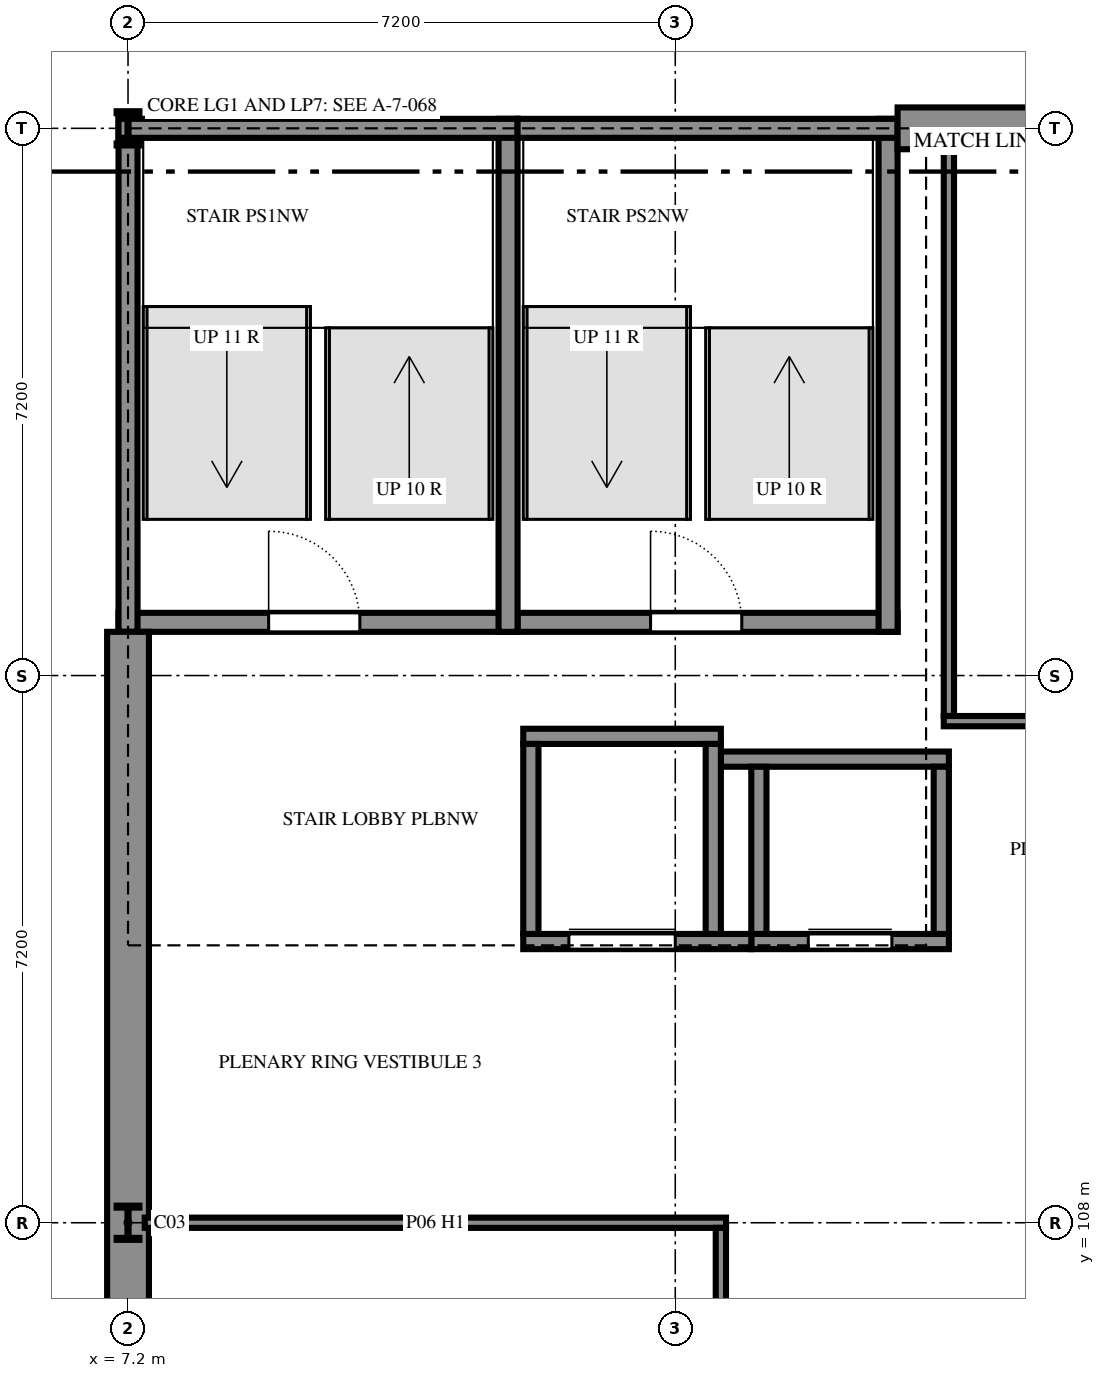
"""IFC4 building model, lengths in metres.
Left out: names, types, materials, properties, quantities, classifications, styles, units other than length and angle.
Written with IfcOpenShell. Run it as: python <this file> out.ifc"""

import sys

from ifc_helpers import new_model, si_unit, direction, frame, frame_2d, origin, origin_2d, place, context, subcontext, project, spatial, rectangle, i_section, extrude, element, fill, save


model = new_model("IFC4")
c1 = context("Model", 3, precision=1e-05, world=origin(), true_north=direction((0.0, 1.0)))
c2 = subcontext(c1, "Body", "Model", "MODEL_VIEW")
j1 = project(units=[si_unit("LENGTHUNIT", "METRE"), si_unit("PLANEANGLEUNIT", "RADIAN")], contexts=[c1])
p1 = place(None, origin())
s1 = spatial("IfcSite", under=j1, at=p1, CompositionType="ELEMENT")
p2 = place(p1, origin())
s2 = spatial("IfcBuilding", under=s1, at=p2, CompositionType="ELEMENT")
p3 = place(p2, frame((0.0, 0.0, 3.6)))
s3 = spatial("IfcBuildingStorey", under=s2, at=p3, CompositionType="ELEMENT", Elevation=3.6)
for number, where, z_axis, x_axis in (
    (1, (7.2, 108.0, 0.0), (0.0, 0.0, 1.0), (1.0, 0.0, 0.0)),
    (2, (7.2, 122.4, 0.0), (0.0, 0.0, 1.0), (1.0, 0.0, 0.0)),
):
    element("IfcColumn", number, at=place(p3, frame(where, z_axis=z_axis, x_axis=x_axis)), inside=s3, PredefinedType="COLUMN", context=c2, shape_type="SweptSolid", body=[
        extrude(i_section(OverallWidth=0.3, OverallDepth=0.45, WebThickness=0.014, FlangeThickness=0.026, FilletRadius=0.027, at=origin_2d()), origin(), (0.0, 0.0, 1.0), 3.6),
    ])
p4 = place(p3, frame((7.075, 115.9, 0.0), z_axis=(0.0, 0.0, 1.0), x_axis=(1.0, 0.0, 0.0)))
e3 = element("IfcWall", 3, at=p4, inside=s3, PredefinedType="SHEAR", context=c2, shape_type="SweptSolid", body=[
    extrude(rectangle(XDim=5.25, YDim=0.25, at=frame_2d((2.625, 0.0))), origin(), (0.0, 0.0, 1.0), 3.6),
])
p5 = place(p4, frame((1.975, 0.0, 0.0)))
e4 = element("IfcOpeningElement", 4, at=p5, cuts=e3, PredefinedType="OPENING", context=c2, shape_type="SweptSolid", body=[
    extrude(rectangle(XDim=1.2, YDim=2.4, at=frame_2d((0.6, 1.2))), frame((0.0, 0.135, 0.0), z_axis=(0.0, -1.0, 0.0), x_axis=(1.0, 0.0, 0.0)), (0.0, 0.0, 1.0), 0.27),
])
p6 = place(p3, frame((12.325, 115.9, 0.0), z_axis=(0.0, 0.0, 1.0), x_axis=(1.0, 0.0, 0.0)))
e5 = element("IfcWall", 5, at=p6, inside=s3, PredefinedType="SHEAR", context=c2, shape_type="SweptSolid", body=[
    extrude(rectangle(XDim=5.0, YDim=0.25, at=frame_2d((2.5, 0.0))), origin(), (0.0, 0.0, 1.0), 3.6),
])
p7 = place(p6, frame((1.75, 0.0, 0.0)))
e6 = element("IfcOpeningElement", 6, at=p7, cuts=e5, PredefinedType="OPENING", context=c2, shape_type="SweptSolid", body=[
    extrude(rectangle(XDim=1.2, YDim=2.4, at=frame_2d((0.6, 1.2))), frame((0.0, 0.135, 0.0), z_axis=(0.0, -1.0, 0.0), x_axis=(1.0, 0.0, 0.0)), (0.0, 0.0, 1.0), 0.27),
])
for number, where, z_axis, x_axis in (
    (7, (12.2, 115.775, 0.0), (0.0, 0.0, 1.0), (0.0, 1.0, 0.0)),
    (8, (17.2, 115.775, 0.0), (0.0, 0.0, 1.0), (0.0, 1.0, 0.0)),
    (9, (7.2, 122.525, 0.0), (0.0, 0.0, 1.0), (0.0, -1.0, 0.0)),
):
    element("IfcWall", number, at=place(p3, frame(where, z_axis=z_axis, x_axis=x_axis)), inside=s3, PredefinedType="SHEAR", context=c2, shape_type="SweptSolid", body=[
        extrude(rectangle(XDim=6.75, YDim=0.25, at=frame_2d((3.375, 0.0))), origin(), (0.0, 0.0, 1.0), 3.6),
    ])
p8 = place(p3, frame((12.325, 122.4, 0.0), z_axis=(0.0, 0.0, 1.0), x_axis=(-1.0, 0.0, 0.0)))
e10 = element("IfcWall", 10, at=p8, inside=s3, PredefinedType="SHEAR", context=c2, shape_type="SweptSolid", body=[
    extrude(rectangle(XDim=5.25, YDim=0.25, at=frame_2d((2.625, 0.0))), origin(), (0.0, 0.0, 1.0), 3.6),
])
p9 = place(p3, frame((17.325, 122.4, 0.0), z_axis=(0.0, 0.0, 1.0), x_axis=(-1.0, 0.0, 0.0)))
e11 = element("IfcWall", 11, at=p9, inside=s3, PredefinedType="SHEAR", context=c2, shape_type="SweptSolid", body=[
    extrude(rectangle(XDim=5.0, YDim=0.25, at=frame_2d((2.5, 0.0))), origin(), (0.0, 0.0, 1.0), 3.6),
])
p10 = place(p3, frame((17.325, 122.4, 0.0), z_axis=(0.0, 0.0, 1.0), x_axis=(1.0, 0.0, 0.0)))
e12 = element("IfcWall", 12, at=p10, inside=s3, PredefinedType="SOLIDWALL", context=c2, shape_type="SweptSolid", body=[
    extrude(rectangle(XDim=47.475, YDim=0.55, at=frame_2d((23.738, 0.0))), origin(), (0.0, 0.0, 1.0), 3.6),
])
p11 = place(p3, frame((7.2, 60.525, 0.0), z_axis=(0.0, 0.0, 1.0), x_axis=(0.0, 1.0, 0.0)))
e13 = element("IfcWall", 13, at=p11, inside=s3, PredefinedType="SOLIDWALL", context=c2, shape_type="SweptSolid", body=[
    extrude(rectangle(XDim=55.25, YDim=0.55, at=frame_2d((27.625, 0.0))), origin(), (0.0, 0.0, 1.0), 3.6),
])
p12 = place(p3, frame((15.4, 111.7, 0.0), z_axis=(0.0, 0.0, 1.0), x_axis=(1.0, 0.0, 0.0)))
e14 = element("IfcWall", 14, at=p12, inside=s3, PredefinedType="SHEAR", context=c2, shape_type="SweptSolid", body=[
    extrude(rectangle(XDim=2.6, YDim=0.2, at=frame_2d((1.3, 0.0))), origin(), (0.0, 0.0, 1.0), 3.6),
])
p13 = place(p12, frame((0.75, 0.0, 0.0)))
e15 = element("IfcOpeningElement", 15, at=p13, cuts=e14, PredefinedType="OPENING", context=c2, shape_type="SweptSolid", body=[
    extrude(rectangle(XDim=1.1, YDim=2.1, at=frame_2d((0.55, 1.05))), frame((0.0, 0.11, 0.0), z_axis=(0.0, -1.0, 0.0), x_axis=(1.0, 0.0, 0.0)), (0.0, 0.0, 1.0), 0.22),
])
p14 = place(p3, frame((15.0, 114.1, 0.0), z_axis=(0.0, 0.0, 1.0), x_axis=(1.0, 0.0, 0.0)))
e16 = element("IfcWall", 16, at=p14, inside=s3, PredefinedType="SHEAR", context=c2, shape_type="SweptSolid", body=[
    extrude(rectangle(XDim=3.0, YDim=0.2, at=frame_2d((1.5, 0.0))), origin(), (0.0, 0.0, 1.0), 3.6),
])
for number, where, z_axis, x_axis in (
    (17, (15.5, 111.8, 0.0), (0.0, 0.0, 1.0), (0.0, 1.0, 0.0)),
    (18, (17.9, 111.8, 0.0), (0.0, 0.0, 1.0), (0.0, 1.0, 0.0)),
):
    element("IfcWall", number, at=place(p3, frame(where, z_axis=z_axis, x_axis=x_axis)), inside=s3, PredefinedType="SHEAR", context=c2, shape_type="SweptSolid", body=[
        extrude(rectangle(XDim=2.2, YDim=0.2, at=frame_2d((1.1, 0.0))), origin(), (0.0, 0.0, 1.0), 3.6),
    ])
p15 = place(p3, frame((12.4, 111.7, 0.0), z_axis=(0.0, 0.0, 1.0), x_axis=(1.0, 0.0, 0.0)))
e19 = element("IfcWall", 19, at=p15, inside=s3, PredefinedType="SHEAR", context=c2, shape_type="SweptSolid", body=[
    extrude(rectangle(XDim=3.0, YDim=0.2, at=frame_2d((1.5, 0.0))), origin(), (0.0, 0.0, 1.0), 3.6),
])
p16 = place(p15, frame((0.6, 0.0, 0.0)))
e20 = element("IfcOpeningElement", 20, at=p16, cuts=e19, PredefinedType="OPENING", context=c2, shape_type="SweptSolid", body=[
    extrude(rectangle(XDim=1.4, YDim=2.1, at=frame_2d((0.7, 1.05))), frame((0.0, 0.11, 0.0), z_axis=(0.0, -1.0, 0.0), x_axis=(1.0, 0.0, 0.0)), (0.0, 0.0, 1.0), 0.22),
])
p17 = place(p3, frame((12.4, 114.4, 0.0), z_axis=(0.0, 0.0, 1.0), x_axis=(1.0, 0.0, 0.0)))
e21 = element("IfcWall", 21, at=p17, inside=s3, PredefinedType="SHEAR", context=c2, shape_type="SweptSolid", body=[
    extrude(rectangle(XDim=2.6, YDim=0.2, at=frame_2d((1.3, 0.0))), origin(), (0.0, 0.0, 1.0), 3.6),
])
for number, where, z_axis, x_axis in (
    (22, (12.5, 111.8, 0.0), (0.0, 0.0, 1.0), (0.0, 1.0, 0.0)),
    (23, (14.9, 111.8, 0.0), (0.0, 0.0, 1.0), (0.0, 1.0, 0.0)),
):
    element("IfcWall", number, at=place(p3, frame(where, z_axis=z_axis, x_axis=x_axis)), inside=s3, PredefinedType="SHEAR", context=c2, shape_type="SweptSolid", body=[
        extrude(rectangle(XDim=2.5, YDim=0.2, at=frame_2d((1.25, 0.0))), origin(), (0.0, 0.0, 1.0), 3.6),
    ])
p18 = place(p3, frame((18.0, 122.18, 0.0), z_axis=(0.0, 0.0, 1.0), x_axis=(0.0, -1.0, 0.0)))
e24 = element("IfcWall", 24, at=p18, inside=s3, PredefinedType="PARTITIONING", context=c2, shape_type="SweptSolid", body=[
    extrude(rectangle(XDim=7.512, YDim=0.135, at=frame_2d((3.756, 0.0))), origin(), (0.0, 0.0, 1.0), 3.12),
])
p19 = place(p3, frame((30.6, 114.6, 0.0), z_axis=(0.0, 0.0, 1.0), x_axis=(-1.0, 0.0, 0.0)))
e25 = element("IfcWall", 25, at=p19, inside=s3, PredefinedType="PARTITIONING", context=c2, shape_type="SweptSolid", body=[
    extrude(rectangle(XDim=12.667, YDim=0.135, at=frame_2d((6.334, 0.0))), origin(), (0.0, 0.0, 1.0), 3.42),
])
p20 = place(p19, frame((5.85, 0.0, 0.0)))
e26 = element("IfcOpeningElement", 26, at=p20, cuts=e25, PredefinedType="OPENING", context=c2, shape_type="SweptSolid", body=[
    extrude(rectangle(XDim=1.0, YDim=2.4, at=frame_2d((0.5, 1.2))), frame((0.0, 0.077, 0.0), z_axis=(0.0, -1.0, 0.0), x_axis=(1.0, 0.0, 0.0)), (0.0, 0.0, 1.0), 0.155),
])
p21 = place(p3, frame((7.42, 108.0, 0.0), z_axis=(0.0, 0.0, 1.0), x_axis=(1.0, 0.0, 0.0)))
e27 = element("IfcWall", 27, at=p21, inside=s3, PredefinedType="PARTITIONING", context=c2, shape_type="SweptSolid", body=[
    extrude(rectangle(XDim=7.647, YDim=0.135, at=frame_2d((3.824, 0.0))), origin(), (0.0, 0.0, 1.0), 2.82),
])
p22 = place(p3, frame((15.0, 107.933, 0.0), z_axis=(0.0, 0.0, 1.0), x_axis=(0.0, -1.0, 0.0)))
e28 = element("IfcWall", 28, at=p22, inside=s3, PredefinedType="PARTITIONING", context=c2, shape_type="SweptSolid", body=[
    extrude(rectangle(XDim=21.395, YDim=0.135, at=frame_2d((10.698, 0.0))), origin(), (0.0, 0.0, 1.0), 3.42),
])
p23 = place(p22, frame((10.15, 0.0, 0.0)))
e29 = element("IfcOpeningElement", 29, at=p23, cuts=e28, PredefinedType="OPENING", context=c2, shape_type="SweptSolid", body=[
    extrude(rectangle(XDim=1.0, YDim=2.4, at=frame_2d((0.5, 1.2))), frame((0.0, 0.077, 0.0), z_axis=(0.0, -1.0, 0.0), x_axis=(1.0, 0.0, 0.0)), (0.0, 0.0, 1.0), 0.155),
])
p24 = place(p13, origin())
e30 = element("IfcDoor", 30, at=p24, inside=s3, OperationType="SLIDING_TO_LEFT", PredefinedType="DOOR", context=c2, shape_type="SweptSolid", body=[
    extrude(rectangle(XDim=1.1, YDim=2.1, at=frame_2d((0.55, 1.05))), frame((0.0, 0.025, 0.0), z_axis=(0.0, -1.0, 0.0), x_axis=(1.0, 0.0, 0.0)), (0.0, 0.0, 1.0), 0.05),
])
fill(e15, e30)
p25 = place(p16, origin())
e31 = element("IfcDoor", 31, at=p25, inside=s3, OperationType="SLIDING_TO_LEFT", PredefinedType="DOOR", context=c2, shape_type="SweptSolid", body=[
    extrude(rectangle(XDim=1.4, YDim=2.1, at=frame_2d((0.7, 1.05))), frame((0.0, 0.025, 0.0), z_axis=(0.0, -1.0, 0.0), x_axis=(1.0, 0.0, 0.0)), (0.0, 0.0, 1.0), 0.05),
])
fill(e20, e31)
p26 = place(p5, origin())
e32 = element("IfcDoor", 32, at=p26, inside=s3, OperationType="SINGLE_SWING_RIGHT", PredefinedType="DOOR", context=c2, shape_type="SweptSolid", body=[
    extrude(rectangle(XDim=1.2, YDim=2.4, at=frame_2d((0.6, 1.2))), frame((0.0, 0.025, 0.0), z_axis=(0.0, -1.0, 0.0), x_axis=(1.0, 0.0, 0.0)), (0.0, 0.0, 1.0), 0.05),
])
fill(e4, e32)
p27 = place(p7, origin())
e33 = element("IfcDoor", 33, at=p27, inside=s3, OperationType="SINGLE_SWING_RIGHT", PredefinedType="DOOR", context=c2, shape_type="SweptSolid", body=[
    extrude(rectangle(XDim=1.2, YDim=2.4, at=frame_2d((0.6, 1.2))), frame((0.0, 0.025, 0.0), z_axis=(0.0, -1.0, 0.0), x_axis=(1.0, 0.0, 0.0)), (0.0, 0.0, 1.0), 0.05),
])
fill(e6, e33)
save(model, sys.argv[1])
